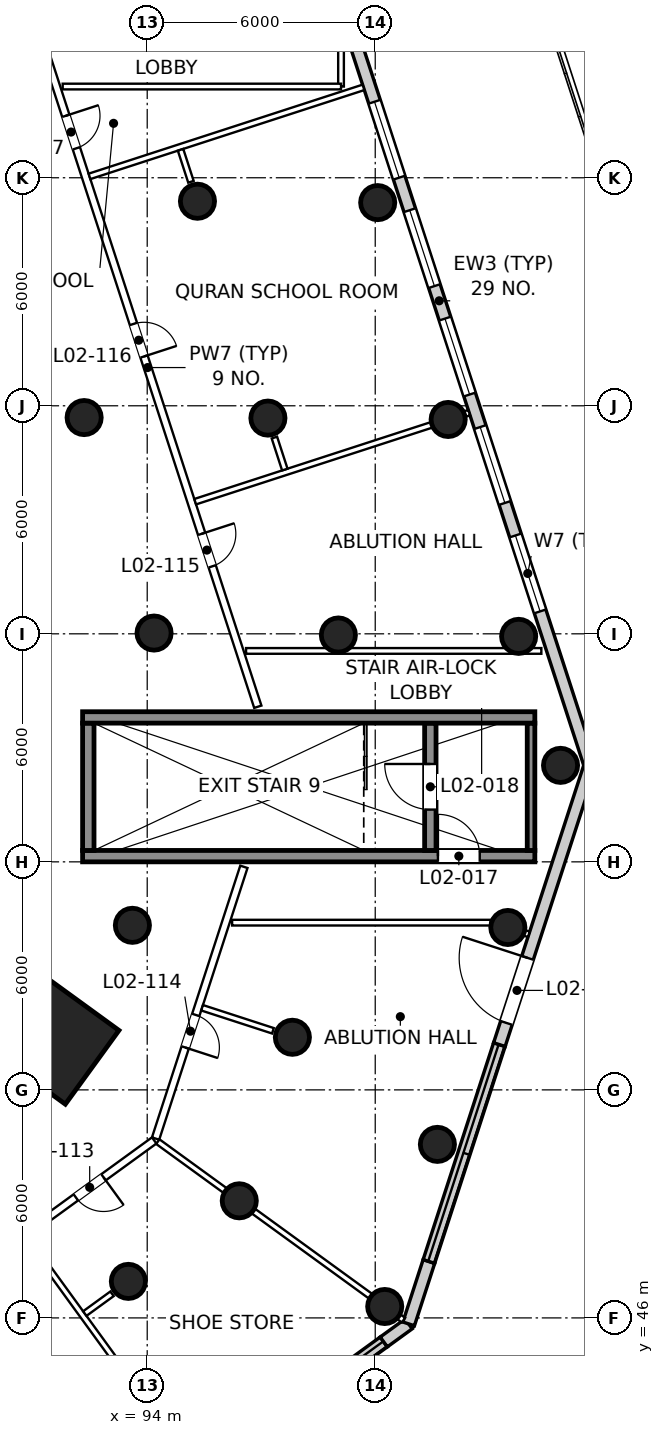
"""IFC4 building model, lengths in metres.
Left out: names, types, materials, properties, quantities, classifications, styles, units other than length and angle.
Written with IfcOpenShell. Run it as: python <this file> out.ifc"""

import sys

from ifc_helpers import new_model, si_unit, direction, frame, frame_2d, origin, origin_2d, place, context, subcontext, project, spatial, rectangle, circle, extrude, element, fill, save


model = new_model("IFC4")
c1 = context("Model", 3, precision=1e-05, world=origin(), true_north=direction((0.0, 1.0)))
c2 = subcontext(c1, "Body", "Model", "MODEL_VIEW")
j1 = project(units=[si_unit("LENGTHUNIT", "METRE"), si_unit("PLANEANGLEUNIT", "RADIAN")], contexts=[c1])
p1 = place(None, origin())
s1 = spatial("IfcSite", under=j1, at=p1, CompositionType="ELEMENT")
p2 = place(p1, origin())
s2 = spatial("IfcBuilding", under=s1, at=p2, CompositionType="ELEMENT")
p3 = place(p2, frame((0.0, 0.0, 15.0)))
s3 = spatial("IfcBuildingStorey", under=s2, at=p3, CompositionType="ELEMENT", Elevation=15.0)
p4 = place(p3, frame((91.58, 53.3, 0.0), z_axis=(0.0, 0.0, 1.0), x_axis=(0.809016994375, -0.587785252292, 0.0)))
e1 = element("IfcColumn", 1, at=p4, inside=s3, PredefinedType="COLUMN", context=c2, shape_type="SweptSolid", body=[
    extrude(rectangle(XDim=2.4, YDim=2.4, at=origin_2d()), origin(), (0.0, 0.0, 1.0), 8.0),
])
for number, where, z_axis, x_axis in (
    (2, (93.61, 56.33, 0.0), (0.0, 0.0, 1.0), (1.0, 0.0, 0.0)),
    (3, (94.18, 64.02, 0.0), (0.0, 0.0, 1.0), (1.0, 0.0, 0.0)),
    (4, (92.34, 69.69, 0.0), (0.0, 0.0, 1.0), (1.0, 0.0, 0.0)),
    (5, (100.25, 46.3, 0.0), (0.0, 0.0, 1.0), (1.0, 0.0, 0.0)),
    (6, (101.636, 50.566, 0.0), (0.0, 0.0, 1.0), (1.0, 0.0, 0.0)),
    (7, (103.49, 56.273, 0.0), (0.0, 0.0, 1.0), (1.0, 0.0, 0.0)),
    (8, (104.876, 60.539, 0.0), (0.0, 0.0, 1.0), (1.0, 0.0, 0.0)),
    (9, (103.774, 63.933, 0.0), (0.0, 0.0, 1.0), (1.0, 0.0, 0.0)),
    (10, (101.919, 69.64, 0.0), (0.0, 0.0, 1.0), (1.0, 0.0, 0.0)),
    (11, (100.065, 75.346, 0.0), (0.0, 0.0, 1.0), (1.0, 0.0, 0.0)),
    (12, (93.504, 46.961, 0.0), (0.0, 0.0, 1.0), (1.0, 0.0, 0.0)),
    (13, (96.422, 49.081, 0.0), (0.0, 0.0, 1.0), (1.0, 0.0, 0.0)),
    (14, (97.82, 53.384, 0.0), (0.0, 0.0, 1.0), (1.0, 0.0, 0.0)),
    (15, (99.03, 63.969, 0.0), (0.0, 0.0, 1.0), (1.0, 0.0, 0.0)),
    (16, (97.176, 69.676, 0.0), (0.0, 0.0, 1.0), (1.0, 0.0, 0.0)),
    (17, (95.322, 75.382, 0.0), (0.0, 0.0, 1.0), (1.0, 0.0, 0.0)),
):
    element("IfcColumn", number, at=place(p3, frame(where, z_axis=z_axis, x_axis=x_axis)), inside=s3, PredefinedType="COLUMN", context=c2, shape_type="SweptSolid", body=[
        extrude(circle(Radius=0.45, at=origin_2d()), origin(), (0.0, 0.0, 1.0), 8.0),
    ])
p5 = place(p3, frame((90.516, 38.313, 0.0), z_axis=(0.0, 0.0, 1.0), x_axis=(0.809016642472, 0.587785736645, 0.0)))
e18 = element("IfcWall", 18, at=p5, inside=s3, PredefinedType="SOLIDWALL", context=c2, shape_type="SweptSolid", body=[
    extrude(rectangle(XDim=12.0, YDim=0.32, at=frame_2d((6.0, 0.0))), origin(), (0.0, 0.0, 1.0), 2.5),
])
p6 = place(p3, frame((100.225, 45.367, 0.0), z_axis=(0.0, 0.0, 1.0), x_axis=(0.808957761835, 0.587866770252, 0.0)))
e19 = element("IfcWall", 19, at=p6, inside=s3, PredefinedType="SOLIDWALL", context=c2, shape_type="SweptSolid", body=[
    extrude(rectangle(XDim=0.809, YDim=0.32, at=frame_2d((0.405, 0.0))), origin(), (0.0, 0.0, 1.0), 7.65),
])
p7 = place(p3, frame((100.879, 45.843, 0.0), z_axis=(0.0, 0.0, 1.0), x_axis=(0.309006126888, 0.951060047287, 0.0)))
e20 = element("IfcWall", 20, at=p7, inside=s3, PredefinedType="SOLIDWALL", context=c2, shape_type="SweptSolid", body=[
    extrude(rectangle(XDim=1.726, YDim=0.32, at=frame_2d((0.863, 0.0))), origin(), (0.0, 0.0, 1.0), 7.65),
])
p8 = place(p3, frame((101.413, 47.485, 0.0), z_axis=(0.0, 0.0, 1.0), x_axis=(0.309004184009, 0.95106067854, 0.0)))
e21 = element("IfcWall", 21, at=p8, inside=s3, PredefinedType="SOLIDWALL", context=c2, shape_type="SweptSolid", body=[
    extrude(rectangle(XDim=6.0, YDim=0.32, at=frame_2d((3.0, 0.0))), origin(), (0.0, 0.0, 1.0), 2.5),
])
p9 = place(p3, frame((103.267, 53.191, 0.0), z_axis=(0.0, 0.0, 1.0), x_axis=(0.309033199321, 0.951051250836, 0.0)))
e22 = element("IfcWall", 22, at=p9, inside=s3, PredefinedType="SOLIDWALL", context=c2, shape_type="SweptSolid", body=[
    extrude(rectangle(XDim=7.726, YDim=0.32, at=frame_2d((3.863, 0.0))), origin(), (0.0, 0.0, 1.0), 7.65),
])
p10 = place(p9, frame((0.6, 0.0, 0.0)))
e23 = element("IfcOpeningElement", 23, at=p10, cuts=e22, PredefinedType="OPENING", context=c2, shape_type="SweptSolid", body=[
    extrude(rectangle(XDim=1.8, YDim=2.4, at=frame_2d((0.9, 1.2))), frame((0.0, 0.17, 0.0), z_axis=(0.0, -1.0, 0.0), x_axis=(1.0, 0.0, 0.0)), (0.0, 0.0, 1.0), 0.34),
])
p11 = place(p3, frame((105.655, 60.539, 0.0), z_axis=(0.0, 0.0, 1.0), x_axis=(-0.309020996945, 0.951055215772, 0.0)))
e24 = element("IfcWall", 24, at=p11, inside=s3, PredefinedType="SOLIDWALL", context=c2, shape_type="SweptSolid", body=[
    extrude(rectangle(XDim=25.704, YDim=0.32, at=frame_2d((12.852, 0.0))), origin(), (0.0, 0.0, 1.0), 7.65),
])
p12 = place(p11, frame((4.259, 0.0, 0.9)))
e25 = element("IfcOpeningElement", 25, at=p12, cuts=e24, PredefinedType="OPENING", context=c2, shape_type="SweptSolid", body=[
    extrude(rectangle(XDim=2.1, YDim=3.0, at=frame_2d((1.05, 1.5))), frame((0.0, 0.17, 0.0), z_axis=(0.0, -1.0, 0.0), x_axis=(1.0, 0.0, 0.0)), (0.0, 0.0, 1.0), 0.34),
])
p13 = place(p11, frame((7.259, 0.0, 0.9)))
e26 = element("IfcOpeningElement", 26, at=p13, cuts=e24, PredefinedType="OPENING", context=c2, shape_type="SweptSolid", body=[
    extrude(rectangle(XDim=2.1, YDim=3.0, at=frame_2d((1.05, 1.5))), frame((0.0, 0.17, 0.0), z_axis=(0.0, -1.0, 0.0), x_axis=(1.0, 0.0, 0.0)), (0.0, 0.0, 1.0), 0.34),
])
p14 = place(p11, frame((10.259, 0.0, 0.9)))
e27 = element("IfcOpeningElement", 27, at=p14, cuts=e24, PredefinedType="OPENING", context=c2, shape_type="SweptSolid", body=[
    extrude(rectangle(XDim=2.1, YDim=3.0, at=frame_2d((1.05, 1.5))), frame((0.0, 0.17, 0.0), z_axis=(0.0, -1.0, 0.0), x_axis=(1.0, 0.0, 0.0)), (0.0, 0.0, 1.0), 0.34),
])
p15 = place(p11, frame((13.259, 0.0, 0.9)))
e28 = element("IfcOpeningElement", 28, at=p15, cuts=e24, PredefinedType="OPENING", context=c2, shape_type="SweptSolid", body=[
    extrude(rectangle(XDim=2.1, YDim=3.0, at=frame_2d((1.05, 1.5))), frame((0.0, 0.17, 0.0), z_axis=(0.0, -1.0, 0.0), x_axis=(1.0, 0.0, 0.0)), (0.0, 0.0, 1.0), 0.34),
])
p16 = place(p11, frame((16.259, 0.0, 0.9)))
e29 = element("IfcOpeningElement", 29, at=p16, cuts=e24, PredefinedType="OPENING", context=c2, shape_type="SweptSolid", body=[
    extrude(rectangle(XDim=2.1, YDim=3.0, at=frame_2d((1.05, 1.5))), frame((0.0, 0.17, 0.0), z_axis=(0.0, -1.0, 0.0), x_axis=(1.0, 0.0, 0.0)), (0.0, 0.0, 1.0), 0.34),
])
p17 = place(p3, frame((92.3, 58.15, 0.0), z_axis=(0.0, 0.0, 1.0), x_axis=(1.0, 0.0, 0.0)))
e30 = element("IfcWall", 30, at=p17, inside=s3, PredefinedType="SHEAR", context=c2, shape_type="SweptSolid", body=[
    extrude(rectangle(XDim=11.9, YDim=0.3, at=frame_2d((5.95, 0.0))), origin(), (0.0, 0.0, 1.0), 8.0),
])
p18 = place(p17, frame((9.35, 0.0, 0.0)))
e31 = element("IfcOpeningElement", 31, at=p18, cuts=e30, PredefinedType="OPENING", context=c2, shape_type="SweptSolid", body=[
    extrude(rectangle(XDim=1.1, YDim=2.1, at=frame_2d((0.55, 1.05))), frame((0.0, 0.16, 0.0), z_axis=(0.0, -1.0, 0.0), x_axis=(1.0, 0.0, 0.0)), (0.0, 0.0, 1.0), 0.32),
])
p19 = place(p3, frame((92.45, 58.3, 0.0), z_axis=(0.0, 0.0, 1.0), x_axis=(0.0, 1.0, 0.0)))
e32 = element("IfcWall", 32, at=p19, inside=s3, PredefinedType="SHEAR", context=c2, shape_type="SweptSolid", body=[
    extrude(rectangle(XDim=3.35, YDim=0.3, at=frame_2d((1.675, 0.0))), origin(), (0.0, 0.0, 1.0), 8.0),
])
p20 = place(p3, frame((101.45, 58.3, 0.0), z_axis=(0.0, 0.0, 1.0), x_axis=(0.0, 1.0, 0.0)))
e33 = element("IfcWall", 33, at=p20, inside=s3, PredefinedType="SHEAR", context=c2, shape_type="SweptSolid", body=[
    extrude(rectangle(XDim=3.35, YDim=0.3, at=frame_2d((1.675, 0.0))), origin(), (0.0, 0.0, 1.0), 8.0),
])
p21 = place(p20, frame((1.075, 0.0, 0.0)))
e34 = element("IfcOpeningElement", 34, at=p21, cuts=e33, PredefinedType="OPENING", context=c2, shape_type="SweptSolid", body=[
    extrude(rectangle(XDim=1.2, YDim=2.1, at=frame_2d((0.6, 1.05))), frame((0.0, 0.16, 0.0), z_axis=(0.0, -1.0, 0.0), x_axis=(1.0, 0.0, 0.0)), (0.0, 0.0, 1.0), 0.32),
])
p22 = place(p3, frame((104.1, 58.3, 0.0), z_axis=(0.0, 0.0, 1.0), x_axis=(0.0, 1.0, 0.0)))
e35 = element("IfcWall", 35, at=p22, inside=s3, PredefinedType="SHEAR", context=c2, shape_type="SweptSolid", body=[
    extrude(rectangle(XDim=3.35, YDim=0.2, at=frame_2d((1.675, 0.0))), origin(), (0.0, 0.0, 1.0), 8.0),
])
p23 = place(p3, frame((92.3, 61.8, 0.0), z_axis=(0.0, 0.0, 1.0), x_axis=(1.0, 0.0, 0.0)))
e36 = element("IfcWall", 36, at=p23, inside=s3, PredefinedType="SHEAR", context=c2, shape_type="SweptSolid", body=[
    extrude(rectangle(XDim=11.9, YDim=0.3, at=frame_2d((5.95, 0.0))), origin(), (0.0, 0.0, 1.0), 8.0),
])
p24 = place(p3, frame((91.11, 79.931, 0.0), z_axis=(0.0, 0.0, 1.0), x_axis=(0.309014892187, -0.951057199335, 0.0)))
e37 = element("IfcWall", 37, at=p24, inside=s3, PredefinedType="PARTITIONING", context=c2, shape_type="SweptSolid", body=[
    extrude(rectangle(XDim=18.769, YDim=0.2, at=frame_2d((9.384, 0.0))), origin(), (0.0, 0.0, 1.0), 7.65),
])
p25 = place(p24, frame((13.985, 0.0, 0.0)))
e38 = element("IfcOpeningElement", 38, at=p25, cuts=e37, PredefinedType="OPENING", context=c2, shape_type="SweptSolid", body=[
    extrude(rectangle(XDim=0.9, YDim=2.1, at=frame_2d((0.45, 1.05))), frame((0.0, 0.11, 0.0), z_axis=(0.0, -1.0, 0.0), x_axis=(1.0, 0.0, 0.0)), (0.0, 0.0, 1.0), 0.22),
])
p26 = place(p24, frame((8.178, 0.0, 0.0)))
e39 = element("IfcOpeningElement", 39, at=p26, cuts=e37, PredefinedType="OPENING", context=c2, shape_type="SweptSolid", body=[
    extrude(rectangle(XDim=0.9, YDim=2.1, at=frame_2d((0.45, 1.05))), frame((0.0, 0.11, 0.0), z_axis=(0.0, -1.0, 0.0), x_axis=(1.0, 0.0, 0.0)), (0.0, 0.0, 1.0), 0.22),
])
p27 = place(p24, frame((2.419, 0.0, 0.0)))
e40 = element("IfcOpeningElement", 40, at=p27, cuts=e37, PredefinedType="OPENING", context=c2, shape_type="SweptSolid", body=[
    extrude(rectangle(XDim=0.9, YDim=2.1, at=frame_2d((0.45, 1.05))), frame((0.0, 0.11, 0.0), z_axis=(0.0, -1.0, 0.0), x_axis=(1.0, 0.0, 0.0)), (0.0, 0.0, 1.0), 0.22),
])
p28 = place(p3, frame((96.543, 57.869, 0.0), z_axis=(0.0, 0.0, 1.0), x_axis=(-0.309019251854, -0.951055782793, 0.0)))
e41 = element("IfcWall", 41, at=p28, inside=s3, PredefinedType="PARTITIONING", context=c2, shape_type="SweptSolid", body=[
    extrude(rectangle(XDim=7.518, YDim=0.2, at=frame_2d((3.759, 0.0))), origin(), (0.0, 0.0, 1.0), 7.65),
])
p29 = place(p28, frame((4.098, 0.0, 0.0)))
e42 = element("IfcOpeningElement", 42, at=p29, cuts=e41, PredefinedType="OPENING", context=c2, shape_type="SweptSolid", body=[
    extrude(rectangle(XDim=0.9, YDim=2.1, at=frame_2d((0.45, 1.05))), frame((0.0, 0.11, 0.0), z_axis=(0.0, -1.0, 0.0), x_axis=(1.0, 0.0, 0.0)), (0.0, 0.0, 1.0), 0.22),
])
p30 = place(p3, frame((94.184, 50.669, 0.0), z_axis=(0.0, 0.0, 1.0), x_axis=(-0.809025571226, -0.587773447089, 0.0)))
e43 = element("IfcWall", 43, at=p30, inside=s3, PredefinedType="PARTITIONING", context=c2, shape_type="SweptSolid", body=[
    extrude(rectangle(XDim=11.156, YDim=0.2, at=frame_2d((5.578, 0.0))), origin(), (0.0, 0.0, 1.0), 7.65),
])
p31 = place(p30, frame((6.352, 0.0, 0.0)))
e44 = element("IfcOpeningElement", 44, at=p31, cuts=e43, PredefinedType="OPENING", context=c2, shape_type="SweptSolid", body=[
    extrude(rectangle(XDim=0.9, YDim=2.1, at=frame_2d((0.45, 1.05))), frame((0.0, 0.11, 0.0), z_axis=(0.0, -1.0, 0.0), x_axis=(1.0, 0.0, 0.0)), (0.0, 0.0, 1.0), 0.22),
])
p32 = place(p30, frame((1.649, 0.0, 0.0)))
e45 = element("IfcOpeningElement", 45, at=p32, cuts=e43, PredefinedType="OPENING", context=c2, shape_type="SweptSolid", body=[
    extrude(rectangle(XDim=0.9, YDim=2.1, at=frame_2d((0.45, 1.05))), frame((0.0, 0.11, 0.0), z_axis=(0.0, -1.0, 0.0), x_axis=(1.0, 0.0, 0.0)), (0.0, 0.0, 1.0), 0.22),
])
p33 = place(p3, frame((100.743, 45.942, 0.0), z_axis=(0.0, 0.0, 1.0), x_axis=(-0.80901214883, 0.587791921556, 0.0)))
e46 = element("IfcWall", 46, at=p33, inside=s3, PredefinedType="PARTITIONING", context=c2, shape_type="SweptSolid", body=[
    extrude(rectangle(XDim=7.99, YDim=0.15, at=frame_2d((3.995, 0.0))), origin(), (0.0, 0.0, 1.0), 7.65),
])
p34 = place(p3, frame((95.276, 41.97, 0.0), z_axis=(0.0, 0.0, 1.0), x_axis=(-0.587779028788, 0.809021515979, 0.0)))
e47 = element("IfcWall", 47, at=p34, inside=s3, PredefinedType="PARTITIONING", context=c2, shape_type="SweptSolid", body=[
    extrude(rectangle(XDim=7.58, YDim=0.15, at=frame_2d((3.79, 0.0))), origin(), (0.0, 0.0, 1.0), 6.95),
])
p35 = place(p3, frame((104.042, 56.094, 0.0), z_axis=(0.0, 0.0, 1.0), x_axis=(-0.951068438916, 0.308980297913, 0.0)))
e48 = element("IfcWall", 48, at=p35, inside=s3, PredefinedType="PARTITIONING", context=c2, shape_type="SweptSolid", body=[
    extrude(rectangle(XDim=0.992, YDim=0.15, at=frame_2d((0.496, 0.0))), origin(), (0.0, 0.0, 1.0), 7.65),
])
for number, where, z_axis, x_axis in (
    (49, (102.471, 69.819, 0.0), (0.0, 0.0, 1.0), (-0.951, -0.309, 0.0)),
    (50, (99.69, 78.378, 0.0), (0.0, 0.0, 1.0), (-0.951, -0.309, 0.0)),
):
    element("IfcWall", number, at=place(p3, frame(where, z_axis=z_axis, x_axis=x_axis)), inside=s3, PredefinedType="PARTITIONING", context=c2, shape_type="SweptSolid", body=[
        extrude(rectangle(XDim=7.58, YDim=0.15, at=frame_2d((3.79, 0.0))), origin(), (0.0, 0.0, 1.0), 6.95),
    ])
p36 = place(p3, frame((93.074, 46.635, 0.0), z_axis=(0.0, 0.0, 1.0), x_axis=(-0.809010335679, -0.587794417092, 0.0)))
e51 = element("IfcWall", 51, at=p36, inside=s3, PredefinedType="PARTITIONING", context=c2, shape_type="SweptSolid", body=[
    extrude(rectangle(XDim=0.885, YDim=0.15, at=frame_2d((0.442, 0.0))), origin(), (0.0, 0.0, 1.0), 6.95),
])
p37 = place(p3, frame((97.308, 53.555, 0.0), z_axis=(0.0, 0.0, 1.0), x_axis=(-0.951047798727, 0.309043823005, 0.0)))
e52 = element("IfcWall", 52, at=p37, inside=s3, PredefinedType="PARTITIONING", context=c2, shape_type="SweptSolid", body=[
    extrude(rectangle(XDim=1.96, YDim=0.15, at=frame_2d((0.98, 0.0))), origin(), (0.0, 0.0, 1.0), 7.65),
])
p38 = place(p3, frame((97.347, 69.164, 0.0), z_axis=(0.0, 0.0, 1.0), x_axis=(0.309104777097, -0.951027989481, 0.0)))
e53 = element("IfcWall", 53, at=p38, inside=s3, PredefinedType="PARTITIONING", context=c2, shape_type="SweptSolid", body=[
    extrude(rectangle(XDim=0.885, YDim=0.15, at=frame_2d((0.443, 0.0))), origin(), (0.0, 0.0, 1.0), 6.95),
])
p39 = place(p3, frame((95.151, 75.894, 0.0), z_axis=(0.0, 0.0, 1.0), x_axis=(-0.308936377944, 0.951082706384, 0.0)))
e54 = element("IfcWall", 54, at=p39, inside=s3, PredefinedType="PARTITIONING", context=c2, shape_type="SweptSolid", body=[
    extrude(rectangle(XDim=0.885, YDim=0.15, at=frame_2d((0.442, 0.0))), origin(), (0.0, 0.0, 1.0), 6.95),
])
p40 = place(p3, frame((99.1, 78.4, 0.0), z_axis=(0.0, 0.0, 1.0), x_axis=(0.0, 1.0, 0.0)))
e55 = element("IfcWall", 55, at=p40, inside=s3, PredefinedType="PARTITIONING", context=c2, shape_type="SweptSolid", body=[
    extrude(rectangle(XDim=1.374, YDim=0.15, at=frame_2d((0.687, 0.0))), origin(), (0.0, 0.0, 1.0), 6.95),
])
p41 = place(p3, frame((91.776, 78.4, 0.0), z_axis=(0.0, 0.0, 1.0), x_axis=(1.0, 0.0, 0.0)))
e56 = element("IfcWall", 56, at=p41, inside=s3, PredefinedType="PARTITIONING", context=c2, shape_type="SweptSolid", body=[
    extrude(rectangle(XDim=7.324, YDim=0.15, at=frame_2d((3.662, 0.0))), origin(), (0.0, 0.0, 1.0), 6.95),
])
p42 = place(p3, frame((104.371, 63.55, 0.0), z_axis=(0.0, 0.0, 1.0), x_axis=(-1.0, 0.0, 0.0)))
e57 = element("IfcWall", 57, at=p42, inside=s3, PredefinedType="PARTITIONING", context=c2, shape_type="SweptSolid", body=[
    extrude(rectangle(XDim=7.77, YDim=0.15, at=frame_2d((3.885, 0.0))), origin(), (0.0, 0.0, 1.0), 7.65),
])
p43 = place(p3, frame((96.234, 56.4, 0.0), z_axis=(0.0, 0.0, 1.0), x_axis=(1.0, 0.0, 0.0)))
e58 = element("IfcWall", 58, at=p43, inside=s3, PredefinedType="PARTITIONING", context=c2, shape_type="SweptSolid", body=[
    extrude(rectangle(XDim=6.801, YDim=0.15, at=frame_2d((3.4, 0.0))), origin(), (0.0, 0.0, 1.0), 6.95),
])
p44 = place(p10, origin())
e59 = element("IfcDoor", 59, at=p44, inside=s3, OperationType="DOUBLE_DOOR_DOUBLE_SWING", PredefinedType="DOOR", context=c2, shape_type="SweptSolid", body=[
    extrude(rectangle(XDim=1.8, YDim=2.4, at=frame_2d((0.9, 1.2))), frame((0.0, 0.04, 0.0), z_axis=(0.0, -1.0, 0.0), x_axis=(1.0, 0.0, 0.0)), (0.0, 0.0, 1.0), 0.05),
])
fill(e23, e59)
p45 = place(p12, origin())
e60 = element("IfcWindow", 60, at=p45, inside=s3, PartitioningType="SINGLE_PANEL", PredefinedType="WINDOW", context=c2, shape_type="SweptSolid", body=[
    extrude(rectangle(XDim=2.1, YDim=3.0, at=frame_2d((1.05, 1.5))), frame((0.0, 0.07, 0.0), z_axis=(0.0, -1.0, 0.0), x_axis=(1.0, 0.0, 0.0)), (0.0, 0.0, 1.0), 0.06),
])
fill(e25, e60)
p46 = place(p13, origin())
e61 = element("IfcWindow", 61, at=p46, inside=s3, PartitioningType="SINGLE_PANEL", PredefinedType="WINDOW", context=c2, shape_type="SweptSolid", body=[
    extrude(rectangle(XDim=2.1, YDim=3.0, at=frame_2d((1.05, 1.5))), frame((0.0, 0.07, 0.0), z_axis=(0.0, -1.0, 0.0), x_axis=(1.0, 0.0, 0.0)), (0.0, 0.0, 1.0), 0.06),
])
fill(e26, e61)
p47 = place(p14, origin())
e62 = element("IfcWindow", 62, at=p47, inside=s3, PartitioningType="SINGLE_PANEL", PredefinedType="WINDOW", context=c2, shape_type="SweptSolid", body=[
    extrude(rectangle(XDim=2.1, YDim=3.0, at=frame_2d((1.05, 1.5))), frame((0.0, 0.07, 0.0), z_axis=(0.0, -1.0, 0.0), x_axis=(1.0, 0.0, 0.0)), (0.0, 0.0, 1.0), 0.06),
])
fill(e27, e62)
p48 = place(p15, origin())
e63 = element("IfcWindow", 63, at=p48, inside=s3, PartitioningType="SINGLE_PANEL", PredefinedType="WINDOW", context=c2, shape_type="SweptSolid", body=[
    extrude(rectangle(XDim=2.1, YDim=3.0, at=frame_2d((1.05, 1.5))), frame((0.0, 0.07, 0.0), z_axis=(0.0, -1.0, 0.0), x_axis=(1.0, 0.0, 0.0)), (0.0, 0.0, 1.0), 0.06),
])
fill(e28, e63)
p49 = place(p16, origin())
e64 = element("IfcWindow", 64, at=p49, inside=s3, PartitioningType="SINGLE_PANEL", PredefinedType="WINDOW", context=c2, shape_type="SweptSolid", body=[
    extrude(rectangle(XDim=2.1, YDim=3.0, at=frame_2d((1.05, 1.5))), frame((0.0, 0.07, 0.0), z_axis=(0.0, -1.0, 0.0), x_axis=(1.0, 0.0, 0.0)), (0.0, 0.0, 1.0), 0.06),
])
fill(e29, e64)
p50 = place(p18, origin())
e65 = element("IfcDoor", 65, at=p50, inside=s3, OperationType="SINGLE_SWING_LEFT", PredefinedType="DOOR", context=c2, shape_type="SweptSolid", body=[
    extrude(rectangle(XDim=1.1, YDim=2.1, at=frame_2d((0.55, 1.05))), frame((0.0, 0.025, 0.0), z_axis=(0.0, -1.0, 0.0), x_axis=(1.0, 0.0, 0.0)), (0.0, 0.0, 1.0), 0.05),
])
fill(e31, e65)
p51 = place(p21, origin())
e66 = element("IfcDoor", 66, at=p51, inside=s3, OperationType="SINGLE_SWING_RIGHT", PredefinedType="DOOR", context=c2, shape_type="SweptSolid", body=[
    extrude(rectangle(XDim=1.2, YDim=2.1, at=frame_2d((0.6, 1.05))), frame((0.0, 0.025, 0.0), z_axis=(0.0, -1.0, 0.0), x_axis=(1.0, 0.0, 0.0)), (0.0, 0.0, 1.0), 0.05),
])
fill(e34, e66)
p52 = place(p32, origin())
e67 = element("IfcDoor", 67, at=p52, inside=s3, OperationType="SINGLE_SWING_LEFT", PredefinedType="DOOR", context=c2, shape_type="SweptSolid", body=[
    extrude(rectangle(XDim=0.9, YDim=2.1, at=frame_2d((0.45, 1.05))), frame((0.0, 0.025, 0.0), z_axis=(0.0, -1.0, 0.0), x_axis=(1.0, 0.0, 0.0)), (0.0, 0.0, 1.0), 0.05),
])
fill(e45, e67)
p53 = place(p29, origin())
e68 = element("IfcDoor", 68, at=p53, inside=s3, OperationType="SINGLE_SWING_RIGHT", PredefinedType="DOOR", context=c2, shape_type="SweptSolid", body=[
    extrude(rectangle(XDim=0.9, YDim=2.1, at=frame_2d((0.45, 1.05))), frame((0.0, 0.025, 0.0), z_axis=(0.0, -1.0, 0.0), x_axis=(1.0, 0.0, 0.0)), (0.0, 0.0, 1.0), 0.05),
])
fill(e42, e68)
p54 = place(p25, origin())
e69 = element("IfcDoor", 69, at=p54, inside=s3, OperationType="SINGLE_SWING_LEFT", PredefinedType="DOOR", context=c2, shape_type="SweptSolid", body=[
    extrude(rectangle(XDim=0.9, YDim=2.1, at=frame_2d((0.45, 1.05))), frame((0.0, 0.025, 0.0), z_axis=(0.0, -1.0, 0.0), x_axis=(1.0, 0.0, 0.0)), (0.0, 0.0, 1.0), 0.05),
])
fill(e38, e69)
p55 = place(p26, origin())
e70 = element("IfcDoor", 70, at=p55, inside=s3, OperationType="SINGLE_SWING_RIGHT", PredefinedType="DOOR", context=c2, shape_type="SweptSolid", body=[
    extrude(rectangle(XDim=0.9, YDim=2.1, at=frame_2d((0.45, 1.05))), frame((0.0, 0.025, 0.0), z_axis=(0.0, -1.0, 0.0), x_axis=(1.0, 0.0, 0.0)), (0.0, 0.0, 1.0), 0.05),
])
fill(e39, e70)
p56 = place(p27, origin())
e71 = element("IfcDoor", 71, at=p56, inside=s3, OperationType="SINGLE_SWING_LEFT", PredefinedType="DOOR", context=c2, shape_type="SweptSolid", body=[
    extrude(rectangle(XDim=0.9, YDim=2.1, at=frame_2d((0.45, 1.05))), frame((0.0, 0.025, 0.0), z_axis=(0.0, -1.0, 0.0), x_axis=(1.0, 0.0, 0.0)), (0.0, 0.0, 1.0), 0.05),
])
fill(e40, e71)
save(model, sys.argv[1])
